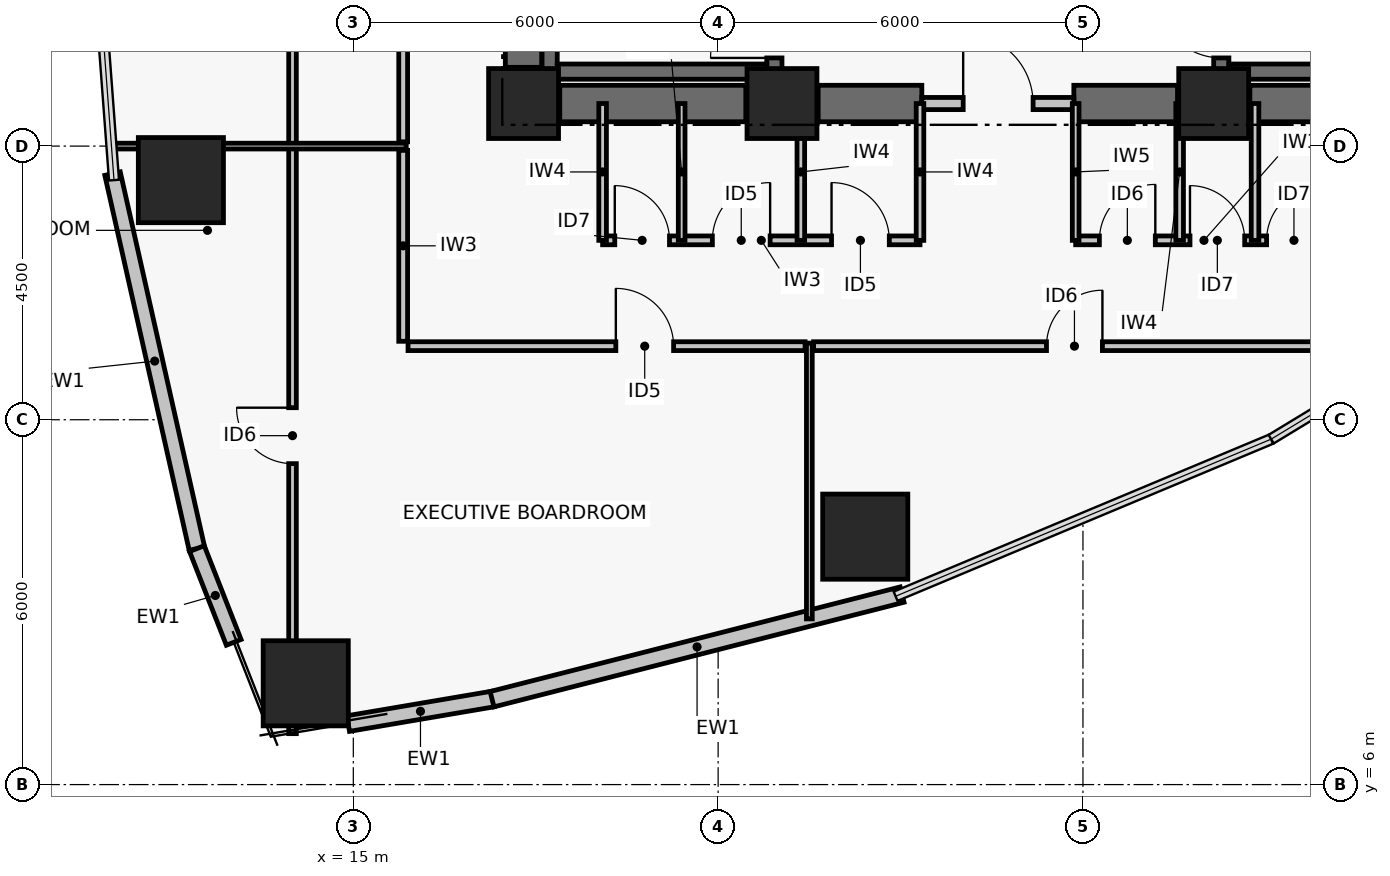
"""IFC4 building model, lengths in metres.
Left out: names, types, materials, properties, quantities, classifications, styles, units other than length and angle.
Written with IfcOpenShell. Run it as: python <this file> out.ifc"""

import sys

from ifc_helpers import new_model, si_unit, direction, frame, frame_2d, origin, origin_2d, place, context, subcontext, project, spatial, rectangle, hollow_rectangle, extrude, element, fill, save


model = new_model("IFC4")
c1 = context("Model", 3, precision=1e-05, world=origin(), true_north=direction((0.0, 1.0)))
c2 = subcontext(c1, "Body", "Model", "MODEL_VIEW")
j1 = project(units=[si_unit("LENGTHUNIT", "METRE"), si_unit("PLANEANGLEUNIT", "RADIAN")], contexts=[c1])
p1 = place(None, origin())
s1 = spatial("IfcSite", under=j1, at=p1, CompositionType="ELEMENT")
p2 = place(p1, origin())
s2 = spatial("IfcBuilding", under=s1, at=p2, CompositionType="ELEMENT")
p3 = place(p2, frame((0.0, 0.0, 42.48)))
s3 = spatial("IfcBuildingStorey", under=s2, at=p3, CompositionType="ELEMENT", Elevation=42.48)
for number, where, z_axis, x_axis in (
    (1, (17.8, 17.2, 0.0), (0.0, 0.0, 1.0), (1.0, 0.0, 0.0)),
    (2, (22.05, 17.2, 0.0), (0.0, 0.0, 1.0), (1.0, 0.0, 0.0)),
    (3, (29.15, 17.2, 0.0), (0.0, 0.0, 1.0), (1.0, 0.0, 0.0)),
):
    element("IfcColumn", number, at=place(p3, frame(where, z_axis=z_axis, x_axis=x_axis)), inside=s3, PredefinedType="COLUMN", context=c2, shape_type="SweptSolid", body=[
        extrude(rectangle(XDim=1.15, YDim=1.15, at=origin_2d()), origin(), (0.0, 0.0, 1.0), 3.72),
    ])
p4 = place(p3, frame((18.395, 17.2, 0.0), z_axis=(0.0, 0.0, 1.0), x_axis=(1.0, 0.0, 0.0)))
e4 = element("IfcWall", 4, at=p4, inside=s3, PredefinedType="SHEAR", context=c2, shape_type="SweptSolid", body=[
    extrude(rectangle(XDim=3.06, YDim=0.6, at=frame_2d((1.53, 0.0))), origin(), (0.0, 0.0, 1.0), 3.47),
])
p5 = place(p3, frame((22.645, 17.2, 0.0), z_axis=(0.0, 0.0, 1.0), x_axis=(1.0, 0.0, 0.0)))
e5 = element("IfcWall", 5, at=p5, inside=s3, PredefinedType="SHEAR", context=c2, shape_type="SweptSolid", body=[
    extrude(rectangle(XDim=1.705, YDim=0.6, at=frame_2d((0.853, 0.0))), origin(), (0.0, 0.0, 1.0), 3.47),
])
p6 = place(p3, frame((26.85, 17.2, 0.0), z_axis=(0.0, 0.0, 1.0), x_axis=(1.0, 0.0, 0.0)))
e6 = element("IfcWall", 6, at=p6, inside=s3, PredefinedType="SHEAR", context=c2, shape_type="SweptSolid", body=[
    extrude(rectangle(XDim=1.705, YDim=0.6, at=frame_2d((0.853, 0.0))), origin(), (0.0, 0.0, 1.0), 3.47),
])
p7 = place(p3, frame((29.745, 17.2, 0.0), z_axis=(0.0, 0.0, 1.0), x_axis=(1.0, 0.0, 0.0)))
e7 = element("IfcWall", 7, at=p7, inside=s3, PredefinedType="SHEAR", context=c2, shape_type="SweptSolid", body=[
    extrude(rectangle(XDim=3.06, YDim=0.6, at=frame_2d((1.53, 0.0))), origin(), (0.0, 0.0, 1.0), 3.47),
])
p8 = place(p3, frame((17.8, 17.795, 0.0), z_axis=(0.0, 0.0, 1.0), x_axis=(0.0, 1.0, 0.0)))
e8 = element("IfcWall", 8, at=p8, inside=s3, PredefinedType="SHEAR", context=c2, shape_type="SweptSolid", body=[
    extrude(rectangle(XDim=8.41, YDim=0.6, at=frame_2d((4.205, 0.0))), origin(), (0.0, 0.0, 1.0), 3.47),
])
p9 = place(p3, frame((18.229, 17.6, 0.0), z_axis=(0.0, 0.0, 1.0), x_axis=(0.0, 1.0, 0.0)))
e9 = element("IfcWall", 9, at=p9, inside=s3, PredefinedType="SHEAR", context=c2, shape_type="SweptSolid", body=[
    extrude(rectangle(XDim=8.8, YDim=0.25, at=frame_2d((4.4, 0.0))), origin(), (0.0, 0.0, 1.0), 3.47),
])
p10 = place(p3, frame((21.925, 17.6, 0.0), z_axis=(0.0, 0.0, 1.0), x_axis=(0.0, 1.0, 0.0)))
e10 = element("IfcWall", 10, at=p10, inside=s3, PredefinedType="SHEAR", context=c2, shape_type="SweptSolid", body=[
    extrude(rectangle(XDim=8.8, YDim=0.25, at=frame_2d((4.4, 0.0))), origin(), (0.0, 0.0, 1.0), 3.47),
])
p11 = place(p10, frame((0.35, 0.0, 0.0)))
e11 = element("IfcOpeningElement", 11, at=p11, cuts=e10, PredefinedType="OPENING", context=c2, shape_type="SweptSolid", body=[
    extrude(rectangle(XDim=1.05, YDim=2.08, at=frame_2d((0.525, 1.04))), frame((0.0, 0.135, 0.0), z_axis=(0.0, -1.0, 0.0), x_axis=(1.0, 0.0, 0.0)), (0.0, 0.0, 1.0), 0.27),
])
p12 = place(p3, frame((18.354, 17.725, 0.0), z_axis=(0.0, 0.0, 1.0), x_axis=(1.0, 0.0, 0.0)))
e12 = element("IfcWall", 12, at=p12, inside=s3, PredefinedType="SHEAR", context=c2, shape_type="SweptSolid", body=[
    extrude(rectangle(XDim=3.446, YDim=0.25, at=frame_2d((1.723, 0.0))), origin(), (0.0, 0.0, 1.0), 3.47),
])
p13 = place(p3, frame((29.275, 17.6, 0.0), z_axis=(0.0, 0.0, 1.0), x_axis=(0.0, 1.0, 0.0)))
e13 = element("IfcWall", 13, at=p13, inside=s3, PredefinedType="SHEAR", context=c2, shape_type="SweptSolid", body=[
    extrude(rectangle(XDim=8.8, YDim=0.25, at=frame_2d((4.4, 0.0))), origin(), (0.0, 0.0, 1.0), 3.47),
])
p14 = place(p13, frame((0.35, 0.0, 0.0)))
e14 = element("IfcOpeningElement", 14, at=p14, cuts=e13, PredefinedType="OPENING", context=c2, shape_type="SweptSolid", body=[
    extrude(rectangle(XDim=1.05, YDim=2.08, at=frame_2d((0.525, 1.04))), frame((0.0, 0.135, 0.0), z_axis=(0.0, -1.0, 0.0), x_axis=(1.0, 0.0, 0.0)), (0.0, 0.0, 1.0), 0.27),
])
p15 = place(p3, frame((29.4, 17.725, 0.0), z_axis=(0.0, 0.0, 1.0), x_axis=(1.0, 0.0, 0.0)))
e15 = element("IfcWall", 15, at=p15, inside=s3, PredefinedType="SHEAR", context=c2, shape_type="SweptSolid", body=[
    extrude(rectangle(XDim=3.446, YDim=0.25, at=frame_2d((1.723, 0.0))), origin(), (0.0, 0.0, 1.0), 3.47),
])
for number, where, z_axis, x_axis in (
    (16, (12.164, 15.94, 0.0), (0.0, 0.0, 1.0), (1.0, 0.0, 0.0)),
    (17, (14.218, 7.666, 0.0), (0.0, 0.0, 1.0), (1.0, 0.0, 0.0)),
    (18, (23.419, 10.077, 0.0), (0.0, 0.0, 1.0), (1.0, 0.0, 0.0)),
):
    element("IfcColumn", number, at=place(p3, frame(where, z_axis=z_axis, x_axis=x_axis)), inside=s3, PredefinedType="COLUMN", context=c2, shape_type="SweptSolid", body=[
        extrude(hollow_rectangle(XDim=1.4, YDim=1.4, WallThickness=0.055, at=origin_2d()), origin(), (0.0, 0.0, 1.0), 3.72),
    ])
p16 = place(p3, frame((12.427, 9.881, 0.0), z_axis=(0.0, 0.0, 1.0), x_axis=(-0.219502085231, 0.975612030768, 0.0)))
e19 = element("IfcWall", 19, at=p16, inside=s3, PredefinedType="PARTITIONING", context=c2, shape_type="SweptSolid", body=[
    extrude(rectangle(XDim=6.321, YDim=0.26, at=frame_2d((3.16, 0.0))), origin(), (0.0, 0.0, 1.0), 3.47),
])
p17 = place(p3, frame((13.033, 8.339, 0.0), z_axis=(0.0, 0.0, 1.0), x_axis=(-0.365666052462, 0.930746119023, 0.0)))
e20 = element("IfcWall", 20, at=p17, inside=s3, PredefinedType="PARTITIONING", context=c2, shape_type="SweptSolid", body=[
    extrude(rectangle(XDim=1.656, YDim=0.26, at=frame_2d((0.828, 0.0))), origin(), (0.0, 0.0, 1.0), 3.47),
])
p18 = place(p3, frame((17.293, 7.407, 0.0), z_axis=(0.0, 0.0, 1.0), x_axis=(-0.985905469923, -0.167303330437, 0.0)))
e21 = element("IfcWall", 21, at=p18, inside=s3, PredefinedType="PARTITIONING", context=c2, shape_type="SweptSolid", body=[
    extrude(rectangle(XDim=2.412, YDim=0.26, at=frame_2d((1.206, 0.0))), origin(), (0.0, 0.0, 1.0), 3.47),
])
p19 = place(p3, frame((24.025, 9.124, 0.0), z_axis=(0.0, 0.0, 1.0), x_axis=(-0.968977974408, -0.247147092057, 0.0)))
e22 = element("IfcWall", 22, at=p19, inside=s3, PredefinedType="PARTITIONING", context=c2, shape_type="SweptSolid", body=[
    extrude(rectangle(XDim=6.959, YDim=0.26, at=frame_2d((3.479, 0.0))), origin(), (0.0, 0.0, 1.0), 3.47),
])
p20 = place(p3, frame((24.35, 17.2, 0.0), z_axis=(0.0, 0.0, 1.0), x_axis=(1.0, 0.0, 0.0)))
e23 = element("IfcWall", 23, at=p20, inside=s3, PredefinedType="PARTITIONING", context=c2, shape_type="SweptSolid", body=[
    extrude(rectangle(XDim=2.5, YDim=0.2, at=frame_2d((1.25, 0.0))), origin(), (0.0, 0.0, 1.0), 2.6),
])
p21 = place(p20, frame((0.68, 0.0, 0.0)))
e24 = element("IfcOpeningElement", 24, at=p21, cuts=e23, PredefinedType="OPENING", context=c2, shape_type="SweptSolid", body=[
    extrude(rectangle(XDim=1.15, YDim=2.08, at=frame_2d((0.575, 1.04))), frame((0.0, 0.11, 0.0), z_axis=(0.0, -1.0, 0.0), x_axis=(1.0, 0.0, 0.0)), (0.0, 0.0, 1.0), 0.22),
])
p22 = place(p3, frame((19.1, 14.95, 0.0), z_axis=(0.0, 0.0, 1.0), x_axis=(1.0, 0.0, 0.0)))
e25 = element("IfcWall", 25, at=p22, inside=s3, PredefinedType="PARTITIONING", context=c2, shape_type="SweptSolid", body=[
    extrude(rectangle(XDim=5.22, YDim=0.145, at=frame_2d((2.61, 0.0))), origin(), (0.0, 0.0, 1.0), 2.6),
])
p23 = place(p22, frame((0.2, 0.0, 0.0)))
e26 = element("IfcOpeningElement", 26, at=p23, cuts=e25, PredefinedType="OPENING", context=c2, shape_type="SweptSolid", body=[
    extrude(rectangle(XDim=0.9, YDim=2.02, at=frame_2d((0.45, 1.01))), frame((0.0, 0.083, 0.0), z_axis=(0.0, -1.0, 0.0), x_axis=(1.0, 0.0, 0.0)), (0.0, 0.0, 1.0), 0.165),
])
p24 = place(p22, frame((1.805, 0.0, 0.0)))
e27 = element("IfcOpeningElement", 27, at=p24, cuts=e25, PredefinedType="OPENING", context=c2, shape_type="SweptSolid", body=[
    extrude(rectangle(XDim=0.95, YDim=2.06, at=frame_2d((0.475, 1.03))), frame((0.0, 0.083, 0.0), z_axis=(0.0, -1.0, 0.0), x_axis=(1.0, 0.0, 0.0)), (0.0, 0.0, 1.0), 0.165),
])
p25 = place(p22, frame((3.765, 0.0, 0.0)))
e28 = element("IfcOpeningElement", 28, at=p25, cuts=e25, PredefinedType="OPENING", context=c2, shape_type="SweptSolid", body=[
    extrude(rectangle(XDim=0.95, YDim=2.06, at=frame_2d((0.475, 1.03))), frame((0.0, 0.083, 0.0), z_axis=(0.0, -1.0, 0.0), x_axis=(1.0, 0.0, 0.0)), (0.0, 0.0, 1.0), 0.165),
])
p26 = place(p3, frame((26.88, 14.95, 0.0), z_axis=(0.0, 0.0, 1.0), x_axis=(1.0, 0.0, 0.0)))
e29 = element("IfcWall", 29, at=p26, inside=s3, PredefinedType="PARTITIONING", context=c2, shape_type="SweptSolid", body=[
    extrude(rectangle(XDim=4.22, YDim=0.145, at=frame_2d((2.11, 0.0))), origin(), (0.0, 0.0, 1.0), 3.0),
])
p27 = place(p26, frame((0.39, 0.0, 0.0)))
e30 = element("IfcOpeningElement", 30, at=p27, cuts=e29, PredefinedType="OPENING", context=c2, shape_type="SweptSolid", body=[
    extrude(rectangle(XDim=0.92, YDim=2.05, at=frame_2d((0.46, 1.025))), frame((0.0, 0.083, 0.0), z_axis=(0.0, -1.0, 0.0), x_axis=(1.0, 0.0, 0.0)), (0.0, 0.0, 1.0), 0.165),
])
p28 = place(p26, frame((1.88, 0.0, 0.0)))
e31 = element("IfcOpeningElement", 31, at=p28, cuts=e29, PredefinedType="OPENING", context=c2, shape_type="SweptSolid", body=[
    extrude(rectangle(XDim=0.9, YDim=2.02, at=frame_2d((0.45, 1.01))), frame((0.0, 0.083, 0.0), z_axis=(0.0, -1.0, 0.0), x_axis=(1.0, 0.0, 0.0)), (0.0, 0.0, 1.0), 0.165),
])
p29 = place(p26, frame((3.14, 0.0, 0.0)))
e32 = element("IfcOpeningElement", 32, at=p29, cuts=e29, PredefinedType="OPENING", context=c2, shape_type="SweptSolid", body=[
    extrude(rectangle(XDim=0.9, YDim=2.02, at=frame_2d((0.45, 1.01))), frame((0.0, 0.083, 0.0), z_axis=(0.0, -1.0, 0.0), x_axis=(1.0, 0.0, 0.0)), (0.0, 0.0, 1.0), 0.165),
])
p30 = place(p3, frame((19.1, 14.95, 0.0), z_axis=(0.0, 0.0, 1.0), x_axis=(0.0, 1.0, 0.0)))
e33 = element("IfcWall", 33, at=p30, inside=s3, PredefinedType="PARTITIONING", context=c2, shape_type="SweptSolid", body=[
    extrude(rectangle(XDim=2.25, YDim=0.125, at=frame_2d((1.125, 0.0))), origin(), (0.0, 0.0, 1.0), 2.6),
])
p31 = place(p3, frame((20.4, 14.95, 0.0), z_axis=(0.0, 0.0, 1.0), x_axis=(0.0, 1.0, 0.0)))
e34 = element("IfcWall", 34, at=p31, inside=s3, PredefinedType="PARTITIONING", context=c2, shape_type="SweptSolid", body=[
    extrude(rectangle(XDim=2.25, YDim=0.11, at=frame_2d((1.125, 0.0))), origin(), (0.0, 0.0, 1.0), 2.6),
])
for number, where, z_axis, x_axis in (
    (35, (22.36, 14.95, 0.0), (0.0, 0.0, 1.0), (0.0, 1.0, 0.0)),
    (36, (24.32, 14.95, 0.0), (0.0, 0.0, 1.0), (0.0, 1.0, 0.0)),
):
    element("IfcWall", number, at=place(p3, frame(where, z_axis=z_axis, x_axis=x_axis)), inside=s3, PredefinedType="PARTITIONING", context=c2, shape_type="SweptSolid", body=[
        extrude(rectangle(XDim=2.25, YDim=0.125, at=frame_2d((1.125, 0.0))), origin(), (0.0, 0.0, 1.0), 2.6),
    ])
p32 = place(p3, frame((26.88, 14.95, 0.0), z_axis=(0.0, 0.0, 1.0), x_axis=(0.0, 1.0, 0.0)))
e37 = element("IfcWall", 37, at=p32, inside=s3, PredefinedType="PARTITIONING", context=c2, shape_type="SweptSolid", body=[
    extrude(rectangle(XDim=2.25, YDim=0.11, at=frame_2d((1.125, 0.0))), origin(), (0.0, 0.0, 1.0), 2.6),
])
for number, where, z_axis, x_axis in (
    (38, (28.59, 14.95, 0.0), (0.0, 0.0, 1.0), (0.0, 1.0, 0.0)),
    (39, (29.83, 14.95, 0.0), (0.0, 0.0, 1.0), (0.0, 1.0, 0.0)),
):
    element("IfcWall", number, at=place(p3, frame(where, z_axis=z_axis, x_axis=x_axis)), inside=s3, PredefinedType="PARTITIONING", context=c2, shape_type="SweptSolid", body=[
        extrude(rectangle(XDim=2.25, YDim=0.125, at=frame_2d((1.125, 0.0))), origin(), (0.0, 0.0, 1.0), 2.6),
    ])
p33 = place(p3, frame((15.82, 16.43, 0.0), z_axis=(0.0, 0.0, 1.0), x_axis=(0.0, -1.0, 0.0)))
e40 = element("IfcWall", 40, at=p33, inside=s3, PredefinedType="PARTITIONING", context=c2, shape_type="SweptSolid", body=[
    extrude(rectangle(XDim=3.14, YDim=0.145, at=frame_2d((1.57, 0.0))), origin(), (0.0, 0.0, 1.0), 3.0),
])
p34 = place(p3, frame((15.9, 13.21, 0.0), z_axis=(0.0, 0.0, 1.0), x_axis=(1.0, 0.0, 0.0)))
e41 = element("IfcWall", 41, at=p34, inside=s3, PredefinedType="PARTITIONING", context=c2, shape_type="SweptSolid", body=[
    extrude(rectangle(XDim=6.53, YDim=0.145, at=frame_2d((3.265, 0.0))), origin(), (0.0, 0.0, 1.0), 2.6),
])
p35 = place(p34, frame((3.417, 0.0, 0.0)))
e42 = element("IfcOpeningElement", 42, at=p35, cuts=e41, PredefinedType="OPENING", context=c2, shape_type="SweptSolid", body=[
    extrude(rectangle(XDim=0.95, YDim=2.06, at=frame_2d((0.475, 1.03))), frame((0.0, 0.083, 0.0), z_axis=(0.0, -1.0, 0.0), x_axis=(1.0, 0.0, 0.0)), (0.0, 0.0, 1.0), 0.165),
])
p36 = place(p3, frame((22.57, 13.21, 0.0), z_axis=(0.0, 0.0, 1.0), x_axis=(1.0, 0.0, 0.0)))
e43 = element("IfcWall", 43, at=p36, inside=s3, PredefinedType="PARTITIONING", context=c2, shape_type="SweptSolid", body=[
    extrude(rectangle(XDim=8.58, YDim=0.145, at=frame_2d((4.29, 0.0))), origin(), (0.0, 0.0, 1.0), 2.6),
])
p37 = place(p36, frame((3.83, 0.0, 0.0)))
e44 = element("IfcOpeningElement", 44, at=p37, cuts=e43, PredefinedType="OPENING", context=c2, shape_type="SweptSolid", body=[
    extrude(rectangle(XDim=0.92, YDim=2.05, at=frame_2d((0.46, 1.025))), frame((0.0, 0.083, 0.0), z_axis=(0.0, -1.0, 0.0), x_axis=(1.0, 0.0, 0.0)), (0.0, 0.0, 1.0), 0.165),
])
p38 = place(p3, frame((15.82, 27.43, 0.0), z_axis=(0.0, 0.0, 1.0), x_axis=(0.0, -1.0, 0.0)))
e45 = element("IfcWall", 45, at=p38, inside=s3, PredefinedType="PARTITIONING", context=c2, shape_type="SweptSolid", body=[
    extrude(rectangle(XDim=10.86, YDim=0.145, at=frame_2d((5.43, 0.0))), origin(), (0.0, 0.0, 1.0), 2.6),
])
p39 = place(p38, frame((4.955, 0.0, 0.0)))
e46 = element("IfcOpeningElement", 46, at=p39, cuts=e45, PredefinedType="OPENING", context=c2, shape_type="SweptSolid", body=[
    extrude(rectangle(XDim=0.95, YDim=2.06, at=frame_2d((0.475, 1.03))), frame((0.0, 0.083, 0.0), z_axis=(0.0, -1.0, 0.0), x_axis=(1.0, 0.0, 0.0)), (0.0, 0.0, 1.0), 0.165),
])
p40 = place(p3, frame((14.0, 6.838, 0.0), z_axis=(0.0, 0.0, 1.0), x_axis=(0.0, 1.0, 0.0)))
e47 = element("IfcWall", 47, at=p40, inside=s3, PredefinedType="PARTITIONING", context=c2, shape_type="SweptSolid", body=[
    extrude(rectangle(XDim=30.325, YDim=0.125, at=frame_2d((15.162, 0.0))), origin(), (0.0, 0.0, 1.0), 2.6),
])
p41 = place(p40, frame((4.44, 0.0, 0.0)))
e48 = element("IfcOpeningElement", 48, at=p41, cuts=e47, PredefinedType="OPENING", context=c2, shape_type="SweptSolid", body=[
    extrude(rectangle(XDim=0.92, YDim=2.05, at=frame_2d((0.46, 1.025))), frame((0.0, 0.073, 0.0), z_axis=(0.0, -1.0, 0.0), x_axis=(1.0, 0.0, 0.0)), (0.0, 0.0, 1.0), 0.145),
])
p42 = place(p40, frame((24.965, 0.0, 0.0)))
e49 = element("IfcOpeningElement", 49, at=p42, cuts=e47, PredefinedType="OPENING", context=c2, shape_type="SweptSolid", body=[
    extrude(rectangle(XDim=0.92, YDim=2.05, at=frame_2d((0.46, 1.025))), frame((0.0, 0.073, 0.0), z_axis=(0.0, -1.0, 0.0), x_axis=(1.0, 0.0, 0.0)), (0.0, 0.0, 1.0), 0.145),
])
p43 = place(p40, frame((14.702, 0.0, 0.0)))
e50 = element("IfcOpeningElement", 50, at=p43, cuts=e47, PredefinedType="OPENING", context=c2, shape_type="SweptSolid", body=[
    extrude(rectangle(XDim=0.92, YDim=2.05, at=frame_2d((0.46, 1.025))), frame((0.0, 0.073, 0.0), z_axis=(0.0, -1.0, 0.0), x_axis=(1.0, 0.0, 0.0)), (0.0, 0.0, 1.0), 0.145),
])
p44 = place(p3, frame((22.5, 8.725, 0.0), z_axis=(0.0, 0.0, 1.0), x_axis=(0.0, 1.0, 0.0)))
e51 = element("IfcWall", 51, at=p44, inside=s3, PredefinedType="PARTITIONING", context=c2, shape_type="SweptSolid", body=[
    extrude(rectangle(XDim=4.535, YDim=0.095, at=frame_2d((2.268, 0.0))), origin(), (0.0, 0.0, 1.0), 2.85),
])
p45 = place(p3, frame((11.012, 16.5, 0.0), z_axis=(0.0, 0.0, 1.0), x_axis=(1.0, 0.0, 0.0)))
e52 = element("IfcWall", 52, at=p45, inside=s3, PredefinedType="PARTITIONING", context=c2, shape_type="SweptSolid", body=[
    extrude(rectangle(XDim=4.858, YDim=0.095, at=frame_2d((2.429, 0.0))), origin(), (0.0, 0.0, 1.0), 2.6),
])
p46 = place(p11, origin())
e53 = element("IfcDoor", 53, at=p46, inside=s3, OperationType="SINGLE_SWING_LEFT", PredefinedType="DOOR", context=c2, shape_type="SweptSolid", body=[
    extrude(rectangle(XDim=1.05, YDim=2.08, at=frame_2d((0.525, 1.04))), frame((0.0, 0.025, 0.0), z_axis=(0.0, -1.0, 0.0), x_axis=(1.0, 0.0, 0.0)), (0.0, 0.0, 1.0), 0.05),
])
fill(e11, e53)
p47 = place(p14, origin())
e54 = element("IfcDoor", 54, at=p47, inside=s3, OperationType="SINGLE_SWING_RIGHT", PredefinedType="DOOR", context=c2, shape_type="SweptSolid", body=[
    extrude(rectangle(XDim=1.05, YDim=2.08, at=frame_2d((0.525, 1.04))), frame((0.0, 0.025, 0.0), z_axis=(0.0, -1.0, 0.0), x_axis=(1.0, 0.0, 0.0)), (0.0, 0.0, 1.0), 0.05),
])
fill(e14, e54)
p48 = place(p21, origin())
e55 = element("IfcDoor", 55, at=p48, inside=s3, OperationType="SINGLE_SWING_LEFT", PredefinedType="DOOR", context=c2, shape_type="SweptSolid", body=[
    extrude(rectangle(XDim=1.15, YDim=2.08, at=frame_2d((0.575, 1.04))), frame((0.0, 0.025, 0.0), z_axis=(0.0, -1.0, 0.0), x_axis=(1.0, 0.0, 0.0)), (0.0, 0.0, 1.0), 0.05),
])
fill(e24, e55)
p49 = place(p23, origin())
e56 = element("IfcDoor", 56, at=p49, inside=s3, OperationType="SINGLE_SWING_LEFT", PredefinedType="DOOR", context=c2, shape_type="SweptSolid", body=[
    extrude(rectangle(XDim=0.9, YDim=2.02, at=frame_2d((0.45, 1.01))), frame((0.0, 0.025, 0.0), z_axis=(0.0, -1.0, 0.0), x_axis=(1.0, 0.0, 0.0)), (0.0, 0.0, 1.0), 0.05),
])
fill(e26, e56)
p50 = place(p24, origin())
e57 = element("IfcDoor", 57, at=p50, inside=s3, OperationType="SINGLE_SWING_RIGHT", PredefinedType="DOOR", context=c2, shape_type="SweptSolid", body=[
    extrude(rectangle(XDim=0.95, YDim=2.06, at=frame_2d((0.475, 1.03))), frame((0.0, 0.025, 0.0), z_axis=(0.0, -1.0, 0.0), x_axis=(1.0, 0.0, 0.0)), (0.0, 0.0, 1.0), 0.05),
])
fill(e27, e57)
p51 = place(p25, origin())
e58 = element("IfcDoor", 58, at=p51, inside=s3, OperationType="SINGLE_SWING_LEFT", PredefinedType="DOOR", context=c2, shape_type="SweptSolid", body=[
    extrude(rectangle(XDim=0.95, YDim=2.06, at=frame_2d((0.475, 1.03))), frame((0.0, 0.025, 0.0), z_axis=(0.0, -1.0, 0.0), x_axis=(1.0, 0.0, 0.0)), (0.0, 0.0, 1.0), 0.05),
])
fill(e28, e58)
p52 = place(p27, origin())
e59 = element("IfcDoor", 59, at=p52, inside=s3, OperationType="SINGLE_SWING_RIGHT", PredefinedType="DOOR", context=c2, shape_type="SweptSolid", body=[
    extrude(rectangle(XDim=0.92, YDim=2.05, at=frame_2d((0.46, 1.025))), frame((0.0, 0.025, 0.0), z_axis=(0.0, -1.0, 0.0), x_axis=(1.0, 0.0, 0.0)), (0.0, 0.0, 1.0), 0.05),
])
fill(e30, e59)
p53 = place(p28, origin())
e60 = element("IfcDoor", 60, at=p53, inside=s3, OperationType="SINGLE_SWING_LEFT", PredefinedType="DOOR", context=c2, shape_type="SweptSolid", body=[
    extrude(rectangle(XDim=0.9, YDim=2.02, at=frame_2d((0.45, 1.01))), frame((0.0, 0.025, 0.0), z_axis=(0.0, -1.0, 0.0), x_axis=(1.0, 0.0, 0.0)), (0.0, 0.0, 1.0), 0.05),
])
fill(e31, e60)
p54 = place(p29, origin())
e61 = element("IfcDoor", 61, at=p54, inside=s3, OperationType="SINGLE_SWING_RIGHT", PredefinedType="DOOR", context=c2, shape_type="SweptSolid", body=[
    extrude(rectangle(XDim=0.9, YDim=2.02, at=frame_2d((0.45, 1.01))), frame((0.0, 0.025, 0.0), z_axis=(0.0, -1.0, 0.0), x_axis=(1.0, 0.0, 0.0)), (0.0, 0.0, 1.0), 0.05),
])
fill(e32, e61)
p55 = place(p35, origin())
e62 = element("IfcDoor", 62, at=p55, inside=s3, OperationType="SINGLE_SWING_LEFT", PredefinedType="DOOR", context=c2, shape_type="SweptSolid", body=[
    extrude(rectangle(XDim=0.95, YDim=2.06, at=frame_2d((0.475, 1.03))), frame((0.0, 0.025, 0.0), z_axis=(0.0, -1.0, 0.0), x_axis=(1.0, 0.0, 0.0)), (0.0, 0.0, 1.0), 0.05),
])
fill(e42, e62)
p56 = place(p37, origin())
e63 = element("IfcDoor", 63, at=p56, inside=s3, OperationType="SINGLE_SWING_RIGHT", PredefinedType="DOOR", context=c2, shape_type="SweptSolid", body=[
    extrude(rectangle(XDim=0.92, YDim=2.05, at=frame_2d((0.46, 1.025))), frame((0.0, 0.025, 0.0), z_axis=(0.0, -1.0, 0.0), x_axis=(1.0, 0.0, 0.0)), (0.0, 0.0, 1.0), 0.05),
])
fill(e44, e63)
p57 = place(p41, origin())
e64 = element("IfcDoor", 64, at=p57, inside=s3, OperationType="SINGLE_SWING_RIGHT", PredefinedType="DOOR", context=c2, shape_type="SweptSolid", body=[
    extrude(rectangle(XDim=0.92, YDim=2.05, at=frame_2d((0.46, 1.025))), frame((0.0, 0.025, 0.0), z_axis=(0.0, -1.0, 0.0), x_axis=(1.0, 0.0, 0.0)), (0.0, 0.0, 1.0), 0.05),
])
fill(e48, e64)
save(model, sys.argv[1])
